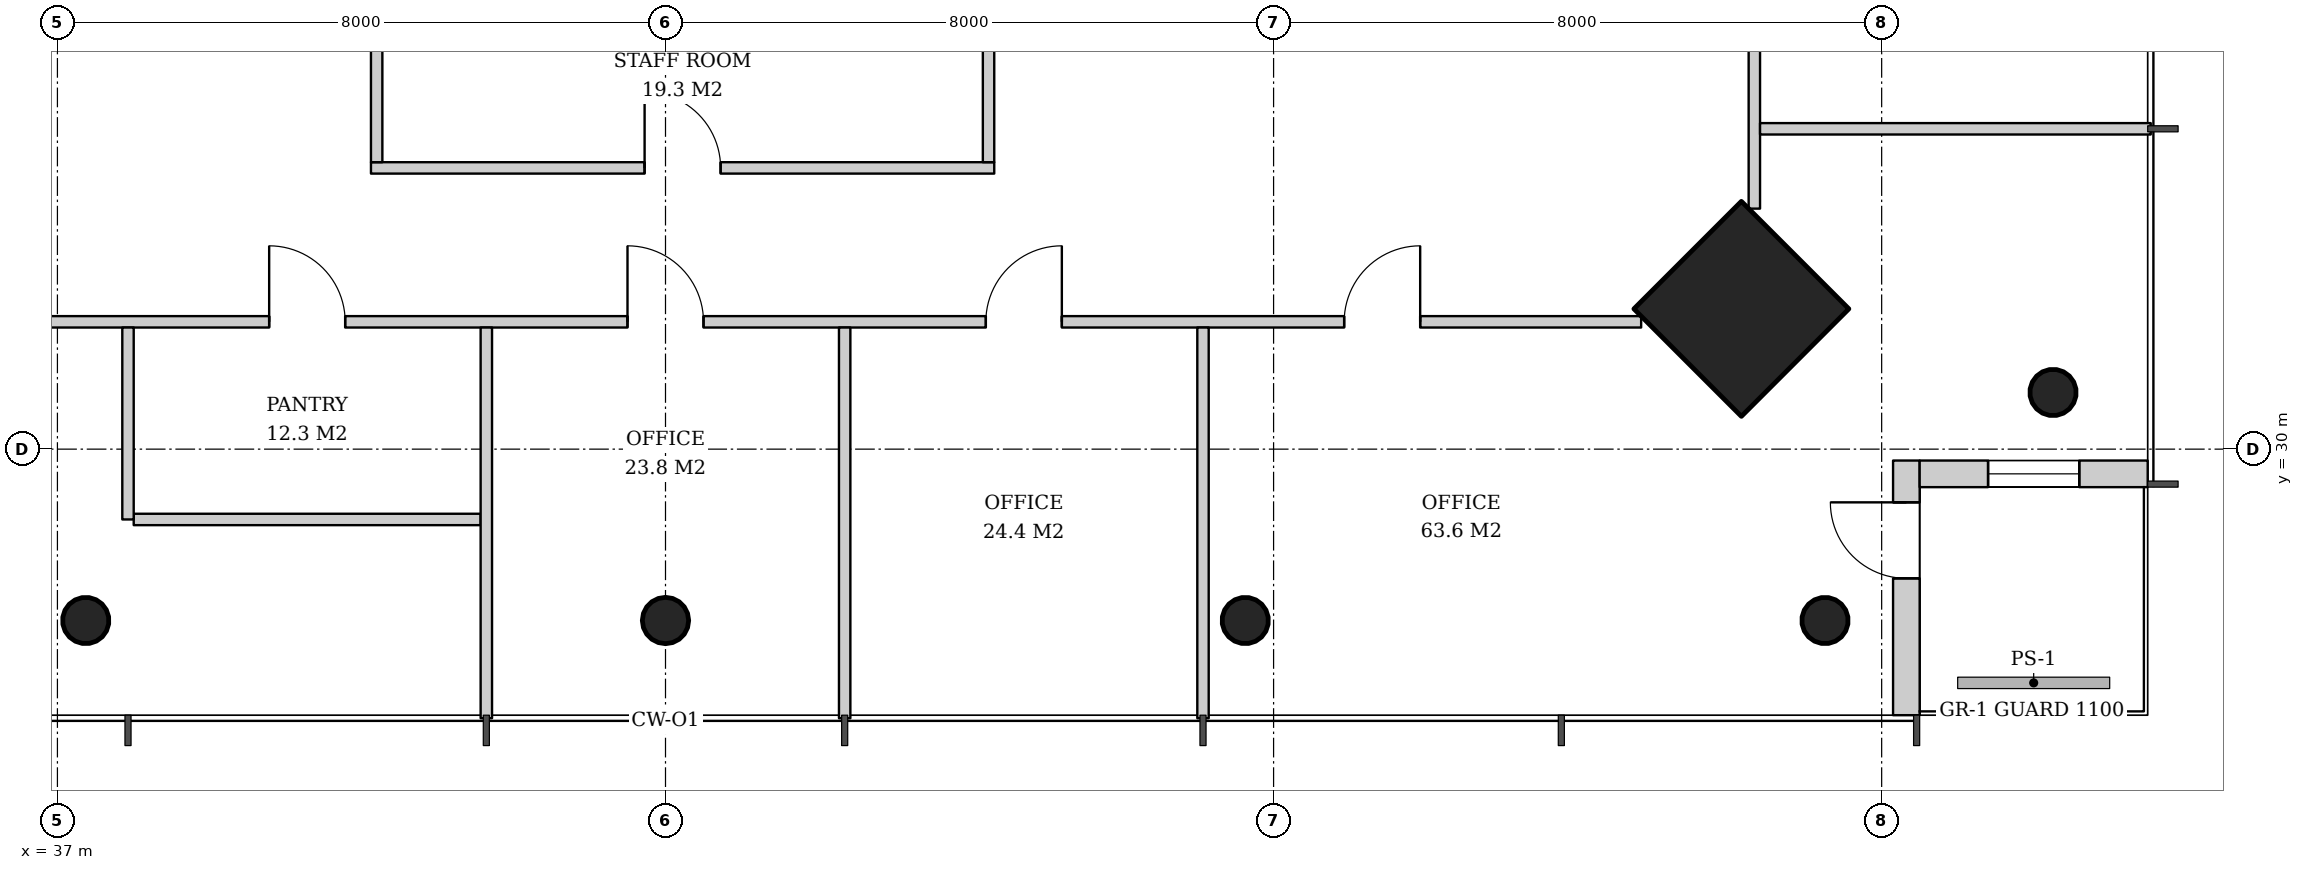
"""IFC4 building model, lengths in metres.
Left out: names, types, materials, properties, quantities, classifications, styles, units other than length and angle.
Written with IfcOpenShell. Run it as: python <this file> out.ifc"""

import sys

from ifc_helpers import new_model, si_unit, direction, frame, frame_2d, origin, origin_2d, place, context, subcontext, project, spatial, rectangle, hollow_circle, extrude, element, fill, save


model = new_model("IFC4")
c1 = context("Model", 3, precision=1e-05, world=origin(), true_north=direction((0.0, 1.0)))
c2 = subcontext(c1, "Body", "Model", "MODEL_VIEW")
j1 = project(units=[si_unit("LENGTHUNIT", "METRE"), si_unit("PLANEANGLEUNIT", "RADIAN")], contexts=[c1])
p1 = place(None, origin())
s1 = spatial("IfcSite", under=j1, at=p1, CompositionType="ELEMENT")
p2 = place(p1, origin())
s2 = spatial("IfcBuilding", under=s1, at=p2, CompositionType="ELEMENT")
p3 = place(p2, frame((0.0, 0.0, 199.6)))
s3 = spatial("IfcBuildingStorey", under=s2, at=p3, CompositionType="ELEMENT", Elevation=199.6)
p4 = place(p3, frame((63.293, 30.707, 0.0), z_axis=(-0.031964207655, 0.031964207655, 0.998977766949), x_axis=(-0.707106781187, -0.707106781187, 0.0)))
e1 = element("IfcColumn", 1, at=p4, inside=s3, PredefinedType="COLUMN", context=c2, shape_type="SweptSolid", body=[
    extrude(hollow_circle(Radius=0.305, WallThickness=0.025, at=origin_2d()), origin(), (0.0, 0.0, 1.0), 3.804),
])
p5 = place(p3, frame((59.193, 31.807, 0.0), z_axis=(-0.031900153262, 0.031900153262, 0.998981861919), x_axis=(-0.707106781187, -0.707106781187, 0.0)))
e2 = element("IfcColumn", 2, at=p5, inside=s3, PredefinedType="COLUMN", context=c2, shape_type="SweptSolid", body=[
    extrude(rectangle(XDim=2.0, YDim=2.0, at=origin_2d()), origin(), (0.0, 0.0, 1.0), 3.804),
])
p6 = place(p3, frame((60.293, 27.707, 0.0), z_axis=(-0.031964207655, 0.031964207655, 0.998977766949), x_axis=(-0.707106781187, -0.707106781187, 0.0)))
e3 = element("IfcColumn", 3, at=p6, inside=s3, PredefinedType="COLUMN", context=c2, shape_type="SweptSolid", body=[
    extrude(hollow_circle(Radius=0.305, WallThickness=0.025, at=origin_2d()), origin(), (0.0, 0.0, 1.0), 3.804),
])
p7 = place(p3, frame((37.354, 27.707, 0.0), z_axis=(0.015988230756, 0.031976461511, 0.999360736865), x_axis=(-0.894427191, 0.4472135955, 0.0)))
e4 = element("IfcColumn", 4, at=p7, inside=s3, PredefinedType="COLUMN", context=c2, shape_type="SweptSolid", body=[
    extrude(hollow_circle(Radius=0.305, WallThickness=0.025, at=origin_2d()), origin(), (0.0, 0.0, 1.0), 3.802),
])
p8 = place(p3, frame((45.0, 27.707, 0.0), z_axis=(0.0, 0.031980549263, 0.999488491414), x_axis=(-1.0, 0.0, 0.0)))
e5 = element("IfcColumn", 5, at=p8, inside=s3, PredefinedType="COLUMN", context=c2, shape_type="SweptSolid", body=[
    extrude(hollow_circle(Radius=0.305, WallThickness=0.025, at=origin_2d()), origin(), (0.0, 0.0, 1.0), 3.802),
])
p9 = place(p3, frame((52.646, 27.707, 0.0), z_axis=(-0.015988230756, 0.031976461511, 0.999360736865), x_axis=(-0.894427191, -0.4472135955, 0.0)))
e6 = element("IfcColumn", 6, at=p9, inside=s3, PredefinedType="COLUMN", context=c2, shape_type="SweptSolid", body=[
    extrude(hollow_circle(Radius=0.305, WallThickness=0.025, at=origin_2d()), origin(), (0.0, 0.0, 1.0), 3.802),
])
p10 = place(p3, frame((61.325, 26.5, 0.0), z_axis=(0.0, 0.0, 1.0), x_axis=(0.0, 1.0, 0.0)))
e7 = element("IfcWall", 7, at=p10, inside=s3, PredefinedType="SOLIDWALL", context=c2, shape_type="SweptSolid", body=[
    extrude(rectangle(XDim=3.35, YDim=0.35, at=frame_2d((1.675, 0.0))), origin(), (0.0, 0.0, 1.0), 3.62),
])
p11 = place(p10, frame((1.8, 0.0, 0.0)))
e8 = element("IfcOpeningElement", 8, at=p11, cuts=e7, PredefinedType="OPENING", context=c2, shape_type="SweptSolid", body=[
    extrude(rectangle(XDim=1.0, YDim=2.4, at=frame_2d((0.5, 1.2))), frame((0.0, 0.185, 0.0), z_axis=(0.0, -1.0, 0.0), x_axis=(1.0, 0.0, 0.0)), (0.0, 0.0, 1.0), 0.37),
])
p12 = place(p3, frame((61.5, 29.675, 0.0), z_axis=(0.0, 0.0, 1.0), x_axis=(1.0, 0.0, 0.0)))
e9 = element("IfcWall", 9, at=p12, inside=s3, PredefinedType="SOLIDWALL", context=c2, shape_type="SweptSolid", body=[
    extrude(rectangle(XDim=3.0, YDim=0.35, at=frame_2d((1.5, 0.0))), origin(), (0.0, 0.0, 1.0), 3.62),
])
p13 = place(p12, frame((0.9, 0.0, 0.6)))
e10 = element("IfcOpeningElement", 10, at=p13, cuts=e9, PredefinedType="OPENING", context=c2, shape_type="SweptSolid", body=[
    extrude(rectangle(XDim=1.2, YDim=2.55, at=frame_2d((0.6, 1.275))), frame((0.0, 0.185, 0.0), z_axis=(0.0, -1.0, 0.0), x_axis=(1.0, 0.0, 0.0)), (0.0, 0.0, 1.0), 0.37),
])
p14 = place(p3, frame((41.125, 33.7, 0.0), z_axis=(0.0, 0.0, 1.0), x_axis=(1.0, 0.0, 0.0)))
e11 = element("IfcWall", 11, at=p14, inside=s3, PredefinedType="PARTITIONING", context=c2, shape_type="SweptSolid", body=[
    extrude(rectangle(XDim=8.2, YDim=0.15, at=frame_2d((4.1, 0.0))), origin(), (0.0, 0.0, 1.0), 2.867),
])
p15 = place(p14, frame((3.6, 0.0, 0.0)))
e12 = element("IfcOpeningElement", 12, at=p15, cuts=e11, PredefinedType="OPENING", context=c2, shape_type="SweptSolid", body=[
    extrude(rectangle(XDim=1.0, YDim=2.1, at=frame_2d((0.5, 1.05))), frame((0.0, 0.085, 0.0), z_axis=(0.0, -1.0, 0.0), x_axis=(1.0, 0.0, 0.0)), (0.0, 0.0, 1.0), 0.17),
])
for number, where, z_axis, x_axis in (
    (13, (41.2, 36.1, 0.0), (0.0, 0.0, 1.0), (0.0, -1.0, 0.0)),
    (14, (49.25, 36.1, 0.0), (0.0, 0.0, 1.0), (0.0, -1.0, 0.0)),
):
    element("IfcWall", number, at=place(p3, frame(where, z_axis=z_axis, x_axis=x_axis)), inside=s3, PredefinedType="PARTITIONING", context=c2, shape_type="SweptSolid", body=[
        extrude(rectangle(XDim=2.325, YDim=0.15, at=frame_2d((1.163, 0.0))), origin(), (0.0, 0.0, 1.0), 3.62),
    ])
p16 = place(p3, frame((59.325, 33.164, 0.0), z_axis=(0.0, 0.0, 1.0), x_axis=(0.0, 1.0, 0.0)))
e15 = element("IfcWall", 15, at=p16, inside=s3, PredefinedType="PARTITIONING", context=c2, shape_type="SweptSolid", body=[
    extrude(rectangle(XDim=25.671, YDim=0.15, at=frame_2d((12.836, 0.0))), origin(), (0.0, 0.0, 1.0), 2.867),
])
p17 = place(p16, frame((2.907, 0.0, 0.0)))
e16 = element("IfcOpeningElement", 16, at=p17, cuts=e15, PredefinedType="OPENING", context=c2, shape_type="SweptSolid", body=[
    extrude(rectangle(XDim=1.0, YDim=2.1, at=frame_2d((0.5, 1.05))), frame((0.0, 0.085, 0.0), z_axis=(0.0, -1.0, 0.0), x_axis=(1.0, 0.0, 0.0)), (0.0, 0.0, 1.0), 0.17),
])
p18 = place(p16, frame((7.622, 0.0, 0.0)))
e17 = element("IfcOpeningElement", 17, at=p18, cuts=e15, PredefinedType="OPENING", context=c2, shape_type="SweptSolid", body=[
    extrude(rectangle(XDim=1.0, YDim=2.1, at=frame_2d((0.5, 1.05))), frame((0.0, 0.085, 0.0), z_axis=(0.0, -1.0, 0.0), x_axis=(1.0, 0.0, 0.0)), (0.0, 0.0, 1.0), 0.17),
])
p19 = place(p16, frame((12.336, 0.0, 0.0)))
e18 = element("IfcOpeningElement", 18, at=p19, cuts=e15, PredefinedType="OPENING", context=c2, shape_type="SweptSolid", body=[
    extrude(rectangle(XDim=1.0, YDim=2.1, at=frame_2d((0.5, 1.05))), frame((0.0, 0.085, 0.0), z_axis=(0.0, -1.0, 0.0), x_axis=(1.0, 0.0, 0.0)), (0.0, 0.0, 1.0), 0.17),
])
p20 = place(p16, frame((17.05, 0.0, 0.0)))
e19 = element("IfcOpeningElement", 19, at=p20, cuts=e15, PredefinedType="OPENING", context=c2, shape_type="SweptSolid", body=[
    extrude(rectangle(XDim=1.0, YDim=2.1, at=frame_2d((0.5, 1.05))), frame((0.0, 0.085, 0.0), z_axis=(0.0, -1.0, 0.0), x_axis=(1.0, 0.0, 0.0)), (0.0, 0.0, 1.0), 0.17),
])
p21 = place(p16, frame((21.764, 0.0, 0.0)))
e20 = element("IfcOpeningElement", 20, at=p21, cuts=e15, PredefinedType="OPENING", context=c2, shape_type="SweptSolid", body=[
    extrude(rectangle(XDim=1.0, YDim=2.1, at=frame_2d((0.5, 1.05))), frame((0.0, 0.085, 0.0), z_axis=(0.0, -1.0, 0.0), x_axis=(1.0, 0.0, 0.0)), (0.0, 0.0, 1.0), 0.17),
])
p22 = place(p3, frame((59.4, 34.214, 0.0), z_axis=(0.0, 0.0, 1.0), x_axis=(1.0, 0.0, 0.0)))
e21 = element("IfcWall", 21, at=p22, inside=s3, PredefinedType="PARTITIONING", context=c2, shape_type="SweptSolid", body=[
    extrude(rectangle(XDim=5.14, YDim=0.15, at=frame_2d((2.57, 0.0))), origin(), (0.0, 0.0, 1.0), 3.12),
])
p23 = place(p3, frame((38.004, 29.075, 0.0), z_axis=(0.0, 0.0, 1.0), x_axis=(1.0, 0.0, 0.0)))
e22 = element("IfcWall", 22, at=p23, inside=s3, PredefinedType="PARTITIONING", context=c2, shape_type="SweptSolid", body=[
    extrude(rectangle(XDim=4.564, YDim=0.15, at=frame_2d((2.282, 0.0))), origin(), (0.0, 0.0, 1.0), 2.867),
])
p24 = place(p3, frame((32.164, 31.675, 0.0), z_axis=(0.0, 0.0, 1.0), x_axis=(1.0, 0.0, 0.0)))
e23 = element("IfcWall", 23, at=p24, inside=s3, PredefinedType="PARTITIONING", context=c2, shape_type="SweptSolid", body=[
    extrude(rectangle(XDim=25.671, YDim=0.15, at=frame_2d((12.836, 0.0))), origin(), (0.0, 0.0, 1.0), 2.867),
])
p25 = place(p24, frame((2.907, 0.0, 0.0)))
e24 = element("IfcOpeningElement", 24, at=p25, cuts=e23, PredefinedType="OPENING", context=c2, shape_type="SweptSolid", body=[
    extrude(rectangle(XDim=1.0, YDim=2.1, at=frame_2d((0.5, 1.05))), frame((0.0, 0.085, 0.0), z_axis=(0.0, -1.0, 0.0), x_axis=(1.0, 0.0, 0.0)), (0.0, 0.0, 1.0), 0.17),
])
p26 = place(p24, frame((7.622, 0.0, 0.0)))
e25 = element("IfcOpeningElement", 25, at=p26, cuts=e23, PredefinedType="OPENING", context=c2, shape_type="SweptSolid", body=[
    extrude(rectangle(XDim=1.0, YDim=2.1, at=frame_2d((0.5, 1.05))), frame((0.0, 0.085, 0.0), z_axis=(0.0, -1.0, 0.0), x_axis=(1.0, 0.0, 0.0)), (0.0, 0.0, 1.0), 0.17),
])
p27 = place(p24, frame((12.336, 0.0, 0.0)))
e26 = element("IfcOpeningElement", 26, at=p27, cuts=e23, PredefinedType="OPENING", context=c2, shape_type="SweptSolid", body=[
    extrude(rectangle(XDim=1.0, YDim=2.1, at=frame_2d((0.5, 1.05))), frame((0.0, 0.085, 0.0), z_axis=(0.0, -1.0, 0.0), x_axis=(1.0, 0.0, 0.0)), (0.0, 0.0, 1.0), 0.17),
])
p28 = place(p24, frame((17.05, 0.0, 0.0)))
e27 = element("IfcOpeningElement", 27, at=p28, cuts=e23, PredefinedType="OPENING", context=c2, shape_type="SweptSolid", body=[
    extrude(rectangle(XDim=1.0, YDim=2.1, at=frame_2d((0.5, 1.05))), frame((0.0, 0.085, 0.0), z_axis=(0.0, -1.0, 0.0), x_axis=(1.0, 0.0, 0.0)), (0.0, 0.0, 1.0), 0.17),
])
p29 = place(p24, frame((21.764, 0.0, 0.0)))
e28 = element("IfcOpeningElement", 28, at=p29, cuts=e23, PredefinedType="OPENING", context=c2, shape_type="SweptSolid", body=[
    extrude(rectangle(XDim=1.0, YDim=2.1, at=frame_2d((0.5, 1.05))), frame((0.0, 0.085, 0.0), z_axis=(0.0, -1.0, 0.0), x_axis=(1.0, 0.0, 0.0)), (0.0, 0.0, 1.0), 0.17),
])
p30 = place(p3, frame((37.928, 31.6, 0.0), z_axis=(0.0, 0.0, 1.0), x_axis=(0.0, -1.0, 0.0)))
e29 = element("IfcWall", 29, at=p30, inside=s3, PredefinedType="PARTITIONING", context=c2, shape_type="SweptSolid", body=[
    extrude(rectangle(XDim=2.525, YDim=0.15, at=frame_2d((1.263, 0.0))), origin(), (0.0, 0.0, 1.0), 3.62),
])
p31 = place(p3, frame((42.643, 31.6, 0.0), z_axis=(0.0, 0.0, 1.0), x_axis=(0.0, -1.0, 0.0)))
e30 = element("IfcWall", 30, at=p31, inside=s3, PredefinedType="PARTITIONING", context=c2, shape_type="SweptSolid", body=[
    extrude(rectangle(XDim=5.14, YDim=0.15, at=frame_2d((2.57, 0.0))), origin(), (0.0, 0.0, 1.0), 3.12),
])
p32 = place(p3, frame((47.357, 31.6, 0.0), z_axis=(0.0, 0.0, 1.0), x_axis=(0.0, -1.0, 0.0)))
e31 = element("IfcWall", 31, at=p32, inside=s3, PredefinedType="PARTITIONING", context=c2, shape_type="SweptSolid", body=[
    extrude(rectangle(XDim=5.14, YDim=0.15, at=frame_2d((2.57, 0.0))), origin(), (0.0, 0.0, 1.0), 2.867),
])
p33 = place(p3, frame((52.072, 31.6, 0.0), z_axis=(0.0, 0.0, 1.0), x_axis=(0.0, -1.0, 0.0)))
e32 = element("IfcWall", 32, at=p33, inside=s3, PredefinedType="PARTITIONING", context=c2, shape_type="SweptSolid", body=[
    extrude(rectangle(XDim=5.14, YDim=0.15, at=frame_2d((2.57, 0.0))), origin(), (0.0, 0.0, 1.0), 3.12),
])
p34 = place(p11, origin())
e33 = element("IfcDoor", 33, at=p34, inside=s3, OperationType="SINGLE_SWING_RIGHT", PredefinedType="DOOR", context=c2, shape_type="SweptSolid", body=[
    extrude(rectangle(XDim=1.0, YDim=2.4, at=frame_2d((0.5, 1.2))), frame((0.0, 0.025, 0.0), z_axis=(0.0, -1.0, 0.0), x_axis=(1.0, 0.0, 0.0)), (0.0, 0.0, 1.0), 0.05),
])
fill(e8, e33)
p35 = place(p13, origin())
e34 = element("IfcWindow", 34, at=p35, inside=s3, PartitioningType="SINGLE_PANEL", PredefinedType="WINDOW", context=c2, shape_type="SweptSolid", body=[
    extrude(rectangle(XDim=1.2, YDim=2.55, at=frame_2d((0.6, 1.275))), frame((0.0, 0.03, 0.0), z_axis=(0.0, -1.0, 0.0), x_axis=(1.0, 0.0, 0.0)), (0.0, 0.0, 1.0), 0.06),
])
fill(e10, e34)
p36 = place(p15, origin())
e35 = element("IfcDoor", 35, at=p36, inside=s3, OperationType="SINGLE_SWING_LEFT", PredefinedType="DOOR", context=c2, shape_type="SweptSolid", body=[
    extrude(rectangle(XDim=1.0, YDim=2.1, at=frame_2d((0.5, 1.05))), frame((0.0, 0.025, 0.0), z_axis=(0.0, -1.0, 0.0), x_axis=(1.0, 0.0, 0.0)), (0.0, 0.0, 1.0), 0.05),
])
fill(e12, e35)
p37 = place(p26, origin())
e36 = element("IfcDoor", 36, at=p37, inside=s3, OperationType="SINGLE_SWING_LEFT", PredefinedType="DOOR", context=c2, shape_type="SweptSolid", body=[
    extrude(rectangle(XDim=1.0, YDim=2.1, at=frame_2d((0.5, 1.05))), frame((0.0, 0.025, 0.0), z_axis=(0.0, -1.0, 0.0), x_axis=(1.0, 0.0, 0.0)), (0.0, 0.0, 1.0), 0.05),
])
fill(e25, e36)
p38 = place(p27, origin())
e37 = element("IfcDoor", 37, at=p38, inside=s3, OperationType="SINGLE_SWING_LEFT", PredefinedType="DOOR", context=c2, shape_type="SweptSolid", body=[
    extrude(rectangle(XDim=1.0, YDim=2.1, at=frame_2d((0.5, 1.05))), frame((0.0, 0.025, 0.0), z_axis=(0.0, -1.0, 0.0), x_axis=(1.0, 0.0, 0.0)), (0.0, 0.0, 1.0), 0.05),
])
fill(e26, e37)
p39 = place(p28, origin())
e38 = element("IfcDoor", 38, at=p39, inside=s3, OperationType="SINGLE_SWING_RIGHT", PredefinedType="DOOR", context=c2, shape_type="SweptSolid", body=[
    extrude(rectangle(XDim=1.0, YDim=2.1, at=frame_2d((0.5, 1.05))), frame((0.0, 0.025, 0.0), z_axis=(0.0, -1.0, 0.0), x_axis=(1.0, 0.0, 0.0)), (0.0, 0.0, 1.0), 0.05),
])
fill(e27, e38)
p40 = place(p29, origin())
e39 = element("IfcDoor", 39, at=p40, inside=s3, OperationType="SINGLE_SWING_RIGHT", PredefinedType="DOOR", context=c2, shape_type="SweptSolid", body=[
    extrude(rectangle(XDim=1.0, YDim=2.1, at=frame_2d((0.5, 1.05))), frame((0.0, 0.025, 0.0), z_axis=(0.0, -1.0, 0.0), x_axis=(1.0, 0.0, 0.0)), (0.0, 0.0, 1.0), 0.05),
])
fill(e28, e39)
save(model, sys.argv[1])
